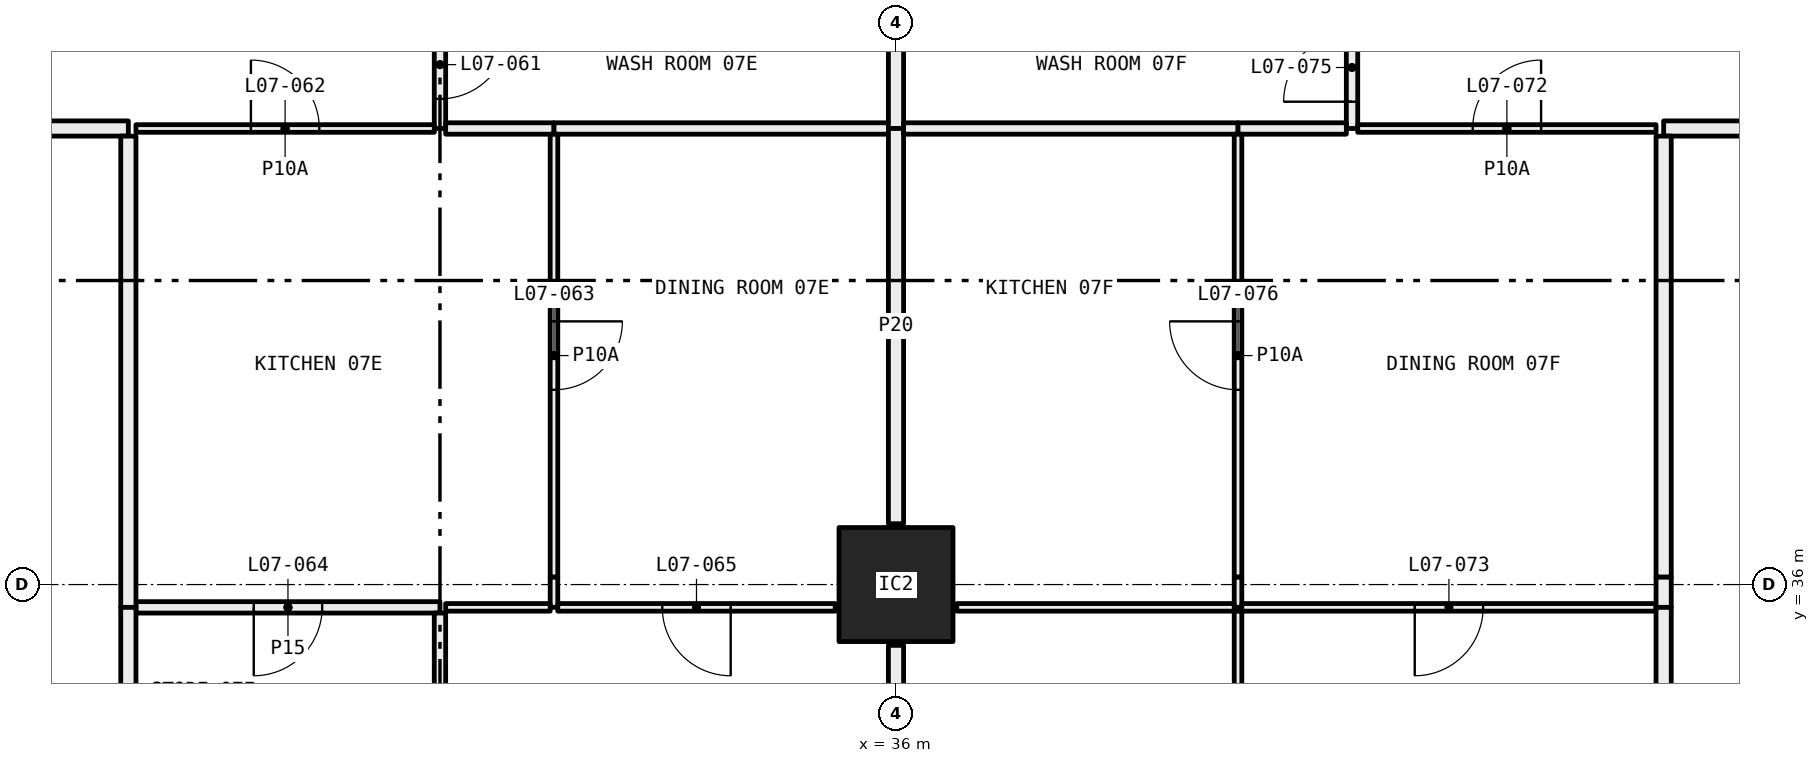
"""IFC4 building model, lengths in metres.
Left out: names, types, materials, properties, quantities, classifications, styles, units other than length and angle.
Written with IfcOpenShell. Run it as: python <this file> out.ifc"""

import sys

from ifc_helpers import new_model, si_unit, direction, frame, frame_2d, origin, origin_2d, place, context, subcontext, project, spatial, rectangle, hollow_rectangle, extrude, element, fill, save


model = new_model("IFC4")
c1 = context("Model", 3, precision=1e-05, world=origin(), true_north=direction((0.0, 1.0)))
c2 = subcontext(c1, "Body", "Model", "MODEL_VIEW")
j1 = project(units=[si_unit("LENGTHUNIT", "METRE"), si_unit("PLANEANGLEUNIT", "RADIAN")], contexts=[c1])
p1 = place(None, origin())
s1 = spatial("IfcSite", under=j1, at=p1, CompositionType="ELEMENT")
p2 = place(p1, origin())
s2 = spatial("IfcBuilding", under=s1, at=p2, CompositionType="ELEMENT")
p3 = place(p2, frame((0.0, 0.0, 36.9)))
s3 = spatial("IfcBuildingStorey", under=s2, at=p3, CompositionType="ELEMENT", Elevation=36.9)
p4 = place(p3, frame((36.0, 36.0, 0.0), z_axis=(0.0, 0.0, 1.0), x_axis=(1.0, 0.0, 0.0)))
e1 = element("IfcColumn", 1, at=p4, inside=s3, PredefinedType="COLUMN", context=c2, shape_type="SweptSolid", body=[
    extrude(hollow_rectangle(XDim=1.5, YDim=1.5, WallThickness=0.065, at=origin_2d()), origin(), (0.0, 0.0, 1.0), 3.05),
])
p5 = place(p3, frame((30.0, 42.0, 0.0), z_axis=(0.0, 0.0, 1.0), x_axis=(0.0, 1.0, 0.0)))
e2 = element("IfcWall", 2, at=p5, inside=s3, PredefinedType="PARTITIONING", context=c2, shape_type="SweptSolid", body=[
    extrude(rectangle(XDim=1.68, YDim=0.15, at=frame_2d((0.84, 0.0))), origin(), (0.0, 0.0, 1.0), 3.05),
])
p6 = place(p5, frame((0.39, 0.0, 0.0)))
e3 = element("IfcOpeningElement", 3, at=p6, cuts=e2, PredefinedType="OPENING", context=c2, shape_type="SweptSolid", body=[
    extrude(rectangle(XDim=0.9, YDim=2.1, at=frame_2d((0.45, 1.05))), frame((0.0, 0.085, 0.0), z_axis=(0.0, -1.0, 0.0), x_axis=(1.0, 0.0, 0.0)), (0.0, 0.0, 1.0), 0.17),
])
p7 = place(p3, frame((26.0, 42.0, 0.0), z_axis=(0.0, 0.0, 1.0), x_axis=(1.0, 0.0, 0.0)))
e4 = element("IfcWall", 4, at=p7, inside=s3, PredefinedType="PARTITIONING", context=c2, shape_type="SweptSolid", body=[
    extrude(rectangle(XDim=3.925, YDim=0.1, at=frame_2d((1.962, 0.0))), origin(), (0.0, 0.0, 1.0), 3.05),
])
p8 = place(p7, frame((1.512, 0.0, 0.0)))
e5 = element("IfcOpeningElement", 5, at=p8, cuts=e4, PredefinedType="OPENING", context=c2, shape_type="SweptSolid", body=[
    extrude(rectangle(XDim=0.9, YDim=2.1, at=frame_2d((0.45, 1.05))), frame((0.0, 0.06, 0.0), z_axis=(0.0, -1.0, 0.0), x_axis=(1.0, 0.0, 0.0)), (0.0, 0.0, 1.0), 0.12),
])
p9 = place(p3, frame((24.0, 42.0, 0.0), z_axis=(0.0, 0.0, 1.0), x_axis=(1.0, 0.0, 0.0)))
e6 = element("IfcWall", 6, at=p9, inside=s3, PredefinedType="PARTITIONING", context=c2, shape_type="SweptSolid", body=[
    extrude(rectangle(XDim=1.9, YDim=0.2, at=frame_2d((0.95, 0.0))), origin(), (0.0, 0.0, 1.0), 3.05),
])
p10 = place(p3, frame((30.075, 42.0, 0.0), z_axis=(0.0, 0.0, 1.0), x_axis=(1.0, 0.0, 0.0)))
e7 = element("IfcWall", 7, at=p10, inside=s3, PredefinedType="PARTITIONING", context=c2, shape_type="SweptSolid", body=[
    extrude(rectangle(XDim=1.425, YDim=0.15, at=frame_2d((0.712, 0.0))), origin(), (0.0, 0.0, 1.0), 3.05),
])
p11 = place(p3, frame((31.5, 42.0, 0.0), z_axis=(0.0, 0.0, 1.0), x_axis=(1.0, 0.0, 0.0)))
e8 = element("IfcWall", 8, at=p11, inside=s3, PredefinedType="PARTITIONING", context=c2, shape_type="SweptSolid", body=[
    extrude(rectangle(XDim=4.4, YDim=0.15, at=frame_2d((2.2, 0.0))), origin(), (0.0, 0.0, 1.0), 3.05),
])
p12 = place(p3, frame((36.0, 42.0, 0.0), z_axis=(0.0, 0.0, 1.0), x_axis=(0.0, 1.0, 0.0)))
e9 = element("IfcWall", 9, at=p12, inside=s3, PredefinedType="PARTITIONING", context=c2, shape_type="SweptSolid", body=[
    extrude(rectangle(XDim=1.68, YDim=0.2, at=frame_2d((0.84, 0.0))), origin(), (0.0, 0.0, 1.0), 2.45),
])
p13 = place(p3, frame((31.5, 35.7, 0.0), z_axis=(0.0, 0.0, 1.0), x_axis=(0.0, 1.0, 0.0)))
e10 = element("IfcWall", 10, at=p13, inside=s3, PredefinedType="PARTITIONING", context=c2, shape_type="SweptSolid", body=[
    extrude(rectangle(XDim=0.4, YDim=0.1, at=frame_2d((0.2, 0.0))), origin(), (0.0, 0.0, 1.0), 2.45),
])
p14 = place(p3, frame((31.5, 36.1, 0.0), z_axis=(0.0, 0.0, 1.0), x_axis=(0.0, 1.0, 0.0)))
e11 = element("IfcWall", 11, at=p14, inside=s3, PredefinedType="PARTITIONING", context=c2, shape_type="SweptSolid", body=[
    extrude(rectangle(XDim=5.825, YDim=0.1, at=frame_2d((2.913, 0.0))), origin(), (0.0, 0.0, 1.0), 3.05),
])
p15 = place(p14, frame((2.462, 0.0, 0.0)))
e12 = element("IfcOpeningElement", 12, at=p15, cuts=e11, PredefinedType="OPENING", context=c2, shape_type="SweptSolid", body=[
    extrude(rectangle(XDim=0.9, YDim=2.1, at=frame_2d((0.45, 1.05))), frame((0.0, 0.06, 0.0), z_axis=(0.0, -1.0, 0.0), x_axis=(1.0, 0.0, 0.0)), (0.0, 0.0, 1.0), 0.12),
])
p16 = place(p3, frame((26.0, 35.7, 0.0), z_axis=(0.0, 0.0, 1.0), x_axis=(1.0, 0.0, 0.0)))
e13 = element("IfcWall", 13, at=p16, inside=s3, PredefinedType="PARTITIONING", context=c2, shape_type="SweptSolid", body=[
    extrude(rectangle(XDim=4.0, YDim=0.15, at=frame_2d((2.0, 0.0))), origin(), (0.0, 0.0, 1.0), 3.05),
])
p17 = place(p16, frame((1.55, 0.0, 0.0)))
e14 = element("IfcOpeningElement", 14, at=p17, cuts=e13, PredefinedType="OPENING", context=c2, shape_type="SweptSolid", body=[
    extrude(rectangle(XDim=0.9, YDim=2.1, at=frame_2d((0.45, 1.05))), frame((0.0, 0.085, 0.0), z_axis=(0.0, -1.0, 0.0), x_axis=(1.0, 0.0, 0.0)), (0.0, 0.0, 1.0), 0.17),
])
p18 = place(p3, frame((30.075, 35.7, 0.0), z_axis=(0.0, 0.0, 1.0), x_axis=(1.0, 0.0, 0.0)))
e15 = element("IfcWall", 15, at=p18, inside=s3, PredefinedType="PARTITIONING", context=c2, shape_type="SweptSolid", body=[
    extrude(rectangle(XDim=1.375, YDim=0.1, at=frame_2d((0.688, 0.0))), origin(), (0.0, 0.0, 1.0), 3.05),
])
p19 = place(p3, frame((25.9, 41.9, 0.0), z_axis=(0.0, 0.0, 1.0), x_axis=(0.0, -1.0, 0.0)))
e16 = element("IfcWall", 16, at=p19, inside=s3, PredefinedType="PARTITIONING", context=c2, shape_type="SweptSolid", body=[
    extrude(rectangle(XDim=6.2, YDim=0.2, at=frame_2d((3.1, 0.0))), origin(), (0.0, 0.0, 1.0), 2.45),
])
p20 = place(p3, frame((31.55, 35.7, 0.0), z_axis=(0.0, 0.0, 1.0), x_axis=(1.0, 0.0, 0.0)))
e17 = element("IfcWall", 17, at=p20, inside=s3, PredefinedType="PARTITIONING", context=c2, shape_type="SweptSolid", body=[
    extrude(rectangle(XDim=3.65, YDim=0.1, at=frame_2d((1.825, 0.0))), origin(), (0.0, 0.0, 1.0), 3.05),
])
p21 = place(p20, frame((1.375, 0.0, 0.0)))
e18 = element("IfcOpeningElement", 18, at=p21, cuts=e17, PredefinedType="OPENING", context=c2, shape_type="SweptSolid", body=[
    extrude(rectangle(XDim=0.9, YDim=2.1, at=frame_2d((0.45, 1.05))), frame((0.0, 0.06, 0.0), z_axis=(0.0, -1.0, 0.0), x_axis=(1.0, 0.0, 0.0)), (0.0, 0.0, 1.0), 0.12),
])
p22 = place(p3, frame((36.0, 36.8, 0.0), z_axis=(0.0, 0.0, 1.0), x_axis=(0.0, 1.0, 0.0)))
e19 = element("IfcWall", 19, at=p22, inside=s3, PredefinedType="PARTITIONING", context=c2, shape_type="SweptSolid", body=[
    extrude(rectangle(XDim=5.2, YDim=0.2, at=frame_2d((2.6, 0.0))), origin(), (0.0, 0.0, 1.0), 2.45),
])
p23 = place(p3, frame((30.0, 33.675, 0.0), z_axis=(0.0, 0.0, 1.0), x_axis=(0.0, 1.0, 0.0)))
e20 = element("IfcWall", 20, at=p23, inside=s3, PredefinedType="PARTITIONING", context=c2, shape_type="SweptSolid", body=[
    extrude(rectangle(XDim=1.95, YDim=0.15, at=frame_2d((0.975, 0.0))), origin(), (0.0, 0.0, 1.0), 3.05),
])
p24 = place(p3, frame((25.9, 35.7, 0.0), z_axis=(0.0, 0.0, 1.0), x_axis=(0.0, -1.0, 0.0)))
e21 = element("IfcWall", 21, at=p24, inside=s3, PredefinedType="PARTITIONING", context=c2, shape_type="SweptSolid", body=[
    extrude(rectangle(XDim=2.1, YDim=0.2, at=frame_2d((1.05, 0.0))), origin(), (0.0, 0.0, 1.0), 3.05),
])
p25 = place(p3, frame((36.0, 31.2, 0.0), z_axis=(0.0, 0.0, 1.0), x_axis=(0.0, 1.0, 0.0)))
e22 = element("IfcWall", 22, at=p25, inside=s3, PredefinedType="PARTITIONING", context=c2, shape_type="SweptSolid", body=[
    extrude(rectangle(XDim=4.0, YDim=0.2, at=frame_2d((2.0, 0.0))), origin(), (0.0, 0.0, 1.0), 2.45),
])
p26 = place(p3, frame((42.0, 42.0, 0.0), z_axis=(0.0, 0.0, 1.0), x_axis=(0.0, 1.0, 0.0)))
e23 = element("IfcWall", 23, at=p26, inside=s3, PredefinedType="PARTITIONING", context=c2, shape_type="SweptSolid", body=[
    extrude(rectangle(XDim=1.605, YDim=0.15, at=frame_2d((0.802, 0.0))), origin(), (0.0, 0.0, 1.0), 3.05),
])
p27 = place(p26, frame((0.353, 0.0, 0.0)))
e24 = element("IfcOpeningElement", 24, at=p27, cuts=e23, PredefinedType="OPENING", context=c2, shape_type="SweptSolid", body=[
    extrude(rectangle(XDim=0.9, YDim=2.1, at=frame_2d((0.45, 1.05))), frame((0.0, 0.085, 0.0), z_axis=(0.0, -1.0, 0.0), x_axis=(1.0, 0.0, 0.0)), (0.0, 0.0, 1.0), 0.17),
])
p28 = place(p3, frame((36.1, 42.0, 0.0), z_axis=(0.0, 0.0, 1.0), x_axis=(1.0, 0.0, 0.0)))
e25 = element("IfcWall", 25, at=p28, inside=s3, PredefinedType="PARTITIONING", context=c2, shape_type="SweptSolid", body=[
    extrude(rectangle(XDim=4.4, YDim=0.15, at=frame_2d((2.2, 0.0))), origin(), (0.0, 0.0, 1.0), 3.05),
])
p29 = place(p3, frame((40.5, 42.0, 0.0), z_axis=(0.0, 0.0, 1.0), x_axis=(1.0, 0.0, 0.0)))
e26 = element("IfcWall", 26, at=p29, inside=s3, PredefinedType="PARTITIONING", context=c2, shape_type="SweptSolid", body=[
    extrude(rectangle(XDim=1.425, YDim=0.15, at=frame_2d((0.712, 0.0))), origin(), (0.0, 0.0, 1.0), 3.05),
])
p30 = place(p3, frame((42.075, 42.0, 0.0), z_axis=(0.0, 0.0, 1.0), x_axis=(1.0, 0.0, 0.0)))
e27 = element("IfcWall", 27, at=p30, inside=s3, PredefinedType="PARTITIONING", context=c2, shape_type="SweptSolid", body=[
    extrude(rectangle(XDim=3.925, YDim=0.1, at=frame_2d((1.962, 0.0))), origin(), (0.0, 0.0, 1.0), 3.05),
])
p31 = place(p30, frame((1.512, 0.0, 0.0)))
e28 = element("IfcOpeningElement", 28, at=p31, cuts=e27, PredefinedType="OPENING", context=c2, shape_type="SweptSolid", body=[
    extrude(rectangle(XDim=0.9, YDim=2.1, at=frame_2d((0.45, 1.05))), frame((0.0, 0.06, 0.0), z_axis=(0.0, -1.0, 0.0), x_axis=(1.0, 0.0, 0.0)), (0.0, 0.0, 1.0), 0.12),
])
p32 = place(p3, frame((46.1, 42.0, 0.0), z_axis=(0.0, 0.0, 1.0), x_axis=(1.0, 0.0, 0.0)))
e29 = element("IfcWall", 29, at=p32, inside=s3, PredefinedType="PARTITIONING", context=c2, shape_type="SweptSolid", body=[
    extrude(rectangle(XDim=1.9, YDim=0.2, at=frame_2d((0.95, 0.0))), origin(), (0.0, 0.0, 1.0), 3.05),
])
p33 = place(p3, frame((40.5, 35.7, 0.0), z_axis=(0.0, 0.0, 1.0), x_axis=(0.0, 1.0, 0.0)))
e30 = element("IfcWall", 30, at=p33, inside=s3, PredefinedType="PARTITIONING", context=c2, shape_type="SweptSolid", body=[
    extrude(rectangle(XDim=0.4, YDim=0.1, at=frame_2d((0.2, 0.0))), origin(), (0.0, 0.0, 1.0), 2.45),
])
p34 = place(p3, frame((40.5, 36.1, 0.0), z_axis=(0.0, 0.0, 1.0), x_axis=(0.0, 1.0, 0.0)))
e31 = element("IfcWall", 31, at=p34, inside=s3, PredefinedType="PARTITIONING", context=c2, shape_type="SweptSolid", body=[
    extrude(rectangle(XDim=5.825, YDim=0.1, at=frame_2d((2.913, 0.0))), origin(), (0.0, 0.0, 1.0), 3.05),
])
p35 = place(p34, frame((2.462, 0.0, 0.0)))
e32 = element("IfcOpeningElement", 32, at=p35, cuts=e31, PredefinedType="OPENING", context=c2, shape_type="SweptSolid", body=[
    extrude(rectangle(XDim=0.9, YDim=2.1, at=frame_2d((0.45, 1.05))), frame((0.0, 0.06, 0.0), z_axis=(0.0, -1.0, 0.0), x_axis=(1.0, 0.0, 0.0)), (0.0, 0.0, 1.0), 0.12),
])
p36 = place(p3, frame((36.8, 35.7, 0.0), z_axis=(0.0, 0.0, 1.0), x_axis=(1.0, 0.0, 0.0)))
e33 = element("IfcWall", 33, at=p36, inside=s3, PredefinedType="PARTITIONING", context=c2, shape_type="SweptSolid", body=[
    extrude(rectangle(XDim=3.65, YDim=0.1, at=frame_2d((1.825, 0.0))), origin(), (0.0, 0.0, 1.0), 3.05),
])
p37 = place(p3, frame((40.55, 35.7, 0.0), z_axis=(0.0, 0.0, 1.0), x_axis=(1.0, 0.0, 0.0)))
e34 = element("IfcWall", 34, at=p37, inside=s3, PredefinedType="PARTITIONING", context=c2, shape_type="SweptSolid", body=[
    extrude(rectangle(XDim=5.45, YDim=0.1, at=frame_2d((2.725, 0.0))), origin(), (0.0, 0.0, 1.0), 3.05),
])
p38 = place(p37, frame((2.275, 0.0, 0.0)))
e35 = element("IfcOpeningElement", 35, at=p38, cuts=e34, PredefinedType="OPENING", context=c2, shape_type="SweptSolid", body=[
    extrude(rectangle(XDim=0.9, YDim=2.1, at=frame_2d((0.45, 1.05))), frame((0.0, 0.06, 0.0), z_axis=(0.0, -1.0, 0.0), x_axis=(1.0, 0.0, 0.0)), (0.0, 0.0, 1.0), 0.12),
])
p39 = place(p3, frame((46.1, 35.7, 0.0), z_axis=(0.0, 0.0, 1.0), x_axis=(0.0, 1.0, 0.0)))
e36 = element("IfcWall", 36, at=p39, inside=s3, PredefinedType="PARTITIONING", context=c2, shape_type="SweptSolid", body=[
    extrude(rectangle(XDim=0.4, YDim=0.2, at=frame_2d((0.2, 0.0))), origin(), (0.0, 0.0, 1.0), 2.45),
])
p40 = place(p3, frame((46.1, 36.1, 0.0), z_axis=(0.0, 0.0, 1.0), x_axis=(0.0, 1.0, 0.0)))
e37 = element("IfcWall", 37, at=p40, inside=s3, PredefinedType="PARTITIONING", context=c2, shape_type="SweptSolid", body=[
    extrude(rectangle(XDim=5.8, YDim=0.2, at=frame_2d((2.9, 0.0))), origin(), (0.0, 0.0, 1.0), 3.05),
])
p41 = place(p3, frame((40.5, 31.3, 0.0), z_axis=(0.0, 0.0, 1.0), x_axis=(0.0, 1.0, 0.0)))
e38 = element("IfcWall", 38, at=p41, inside=s3, PredefinedType="PARTITIONING", context=c2, shape_type="SweptSolid", body=[
    extrude(rectangle(XDim=4.35, YDim=0.1, at=frame_2d((2.175, 0.0))), origin(), (0.0, 0.0, 1.0), 3.05),
])
p42 = place(p41, frame((1.725, 0.0, 0.0)))
e39 = element("IfcOpeningElement", 39, at=p42, cuts=e38, PredefinedType="OPENING", context=c2, shape_type="SweptSolid", body=[
    extrude(rectangle(XDim=0.9, YDim=2.1, at=frame_2d((0.45, 1.05))), frame((0.0, 0.06, 0.0), z_axis=(0.0, -1.0, 0.0), x_axis=(1.0, 0.0, 0.0)), (0.0, 0.0, 1.0), 0.12),
])
p43 = place(p3, frame((46.1, 31.3, 0.0), z_axis=(0.0, 0.0, 1.0), x_axis=(0.0, 1.0, 0.0)))
e40 = element("IfcWall", 40, at=p43, inside=s3, PredefinedType="PARTITIONING", context=c2, shape_type="SweptSolid", body=[
    extrude(rectangle(XDim=4.4, YDim=0.2, at=frame_2d((2.2, 0.0))), origin(), (0.0, 0.0, 1.0), 3.05),
])
p44 = place(p6, frame((0.9, 0.0, 0.0), x_axis=(-1.0, 0.0, 0.0)))
e41 = element("IfcDoor", 41, at=p44, inside=s3, OperationType="SINGLE_SWING_RIGHT", PredefinedType="DOOR", context=c2, shape_type="SweptSolid", body=[
    extrude(rectangle(XDim=0.9, YDim=2.1, at=frame_2d((0.45, 1.05))), frame((0.0, 0.025, 0.0), z_axis=(0.0, -1.0, 0.0), x_axis=(1.0, 0.0, 0.0)), (0.0, 0.0, 1.0), 0.05),
])
fill(e3, e41)
p45 = place(p8, origin())
e42 = element("IfcDoor", 42, at=p45, inside=s3, OperationType="SINGLE_SWING_RIGHT", PredefinedType="DOOR", context=c2, shape_type="SweptSolid", body=[
    extrude(rectangle(XDim=0.9, YDim=2.1, at=frame_2d((0.45, 1.05))), frame((0.0, 0.025, 0.0), z_axis=(0.0, -1.0, 0.0), x_axis=(1.0, 0.0, 0.0)), (0.0, 0.0, 1.0), 0.05),
])
fill(e5, e42)
p46 = place(p15, frame((0.9, 0.0, 0.0), x_axis=(-1.0, 0.0, 0.0)))
e43 = element("IfcDoor", 43, at=p46, inside=s3, OperationType="SINGLE_SWING_RIGHT", PredefinedType="DOOR", context=c2, shape_type="SweptSolid", body=[
    extrude(rectangle(XDim=0.9, YDim=2.1, at=frame_2d((0.45, 1.05))), frame((0.0, 0.025, 0.0), z_axis=(0.0, -1.0, 0.0), x_axis=(1.0, 0.0, 0.0)), (0.0, 0.0, 1.0), 0.05),
])
fill(e12, e43)
p47 = place(p17, frame((0.9, 0.0, 0.0), x_axis=(-1.0, 0.0, 0.0)))
e44 = element("IfcDoor", 44, at=p47, inside=s3, OperationType="SINGLE_SWING_LEFT", PredefinedType="DOOR", context=c2, shape_type="SweptSolid", body=[
    extrude(rectangle(XDim=0.9, YDim=2.1, at=frame_2d((0.45, 1.05))), frame((0.0, 0.025, 0.0), z_axis=(0.0, -1.0, 0.0), x_axis=(1.0, 0.0, 0.0)), (0.0, 0.0, 1.0), 0.05),
])
fill(e14, e44)
p48 = place(p21, frame((0.9, 0.0, 0.0), x_axis=(-1.0, 0.0, 0.0)))
e45 = element("IfcDoor", 45, at=p48, inside=s3, OperationType="SINGLE_SWING_RIGHT", PredefinedType="DOOR", context=c2, shape_type="SweptSolid", body=[
    extrude(rectangle(XDim=0.9, YDim=2.1, at=frame_2d((0.45, 1.05))), frame((0.0, 0.025, 0.0), z_axis=(0.0, -1.0, 0.0), x_axis=(1.0, 0.0, 0.0)), (0.0, 0.0, 1.0), 0.05),
])
fill(e18, e45)
p49 = place(p31, origin())
e46 = element("IfcDoor", 46, at=p49, inside=s3, OperationType="SINGLE_SWING_LEFT", PredefinedType="DOOR", context=c2, shape_type="SweptSolid", body=[
    extrude(rectangle(XDim=0.9, YDim=2.1, at=frame_2d((0.45, 1.05))), frame((0.0, 0.025, 0.0), z_axis=(0.0, -1.0, 0.0), x_axis=(1.0, 0.0, 0.0)), (0.0, 0.0, 1.0), 0.05),
])
fill(e28, e46)
p50 = place(p38, frame((0.9, 0.0, 0.0), x_axis=(-1.0, 0.0, 0.0)))
e47 = element("IfcDoor", 47, at=p50, inside=s3, OperationType="SINGLE_SWING_LEFT", PredefinedType="DOOR", context=c2, shape_type="SweptSolid", body=[
    extrude(rectangle(XDim=0.9, YDim=2.1, at=frame_2d((0.45, 1.05))), frame((0.0, 0.025, 0.0), z_axis=(0.0, -1.0, 0.0), x_axis=(1.0, 0.0, 0.0)), (0.0, 0.0, 1.0), 0.05),
])
fill(e35, e47)
p51 = place(p27, origin())
e48 = element("IfcDoor", 48, at=p51, inside=s3, OperationType="SINGLE_SWING_RIGHT", PredefinedType="DOOR", context=c2, shape_type="SweptSolid", body=[
    extrude(rectangle(XDim=0.9, YDim=2.1, at=frame_2d((0.45, 1.05))), frame((0.0, 0.025, 0.0), z_axis=(0.0, -1.0, 0.0), x_axis=(1.0, 0.0, 0.0)), (0.0, 0.0, 1.0), 0.05),
])
fill(e24, e48)
p52 = place(p35, origin())
e49 = element("IfcDoor", 49, at=p52, inside=s3, OperationType="SINGLE_SWING_LEFT", PredefinedType="DOOR", context=c2, shape_type="SweptSolid", body=[
    extrude(rectangle(XDim=0.9, YDim=2.1, at=frame_2d((0.45, 1.05))), frame((0.0, 0.025, 0.0), z_axis=(0.0, -1.0, 0.0), x_axis=(1.0, 0.0, 0.0)), (0.0, 0.0, 1.0), 0.05),
])
fill(e32, e49)
save(model, sys.argv[1])
